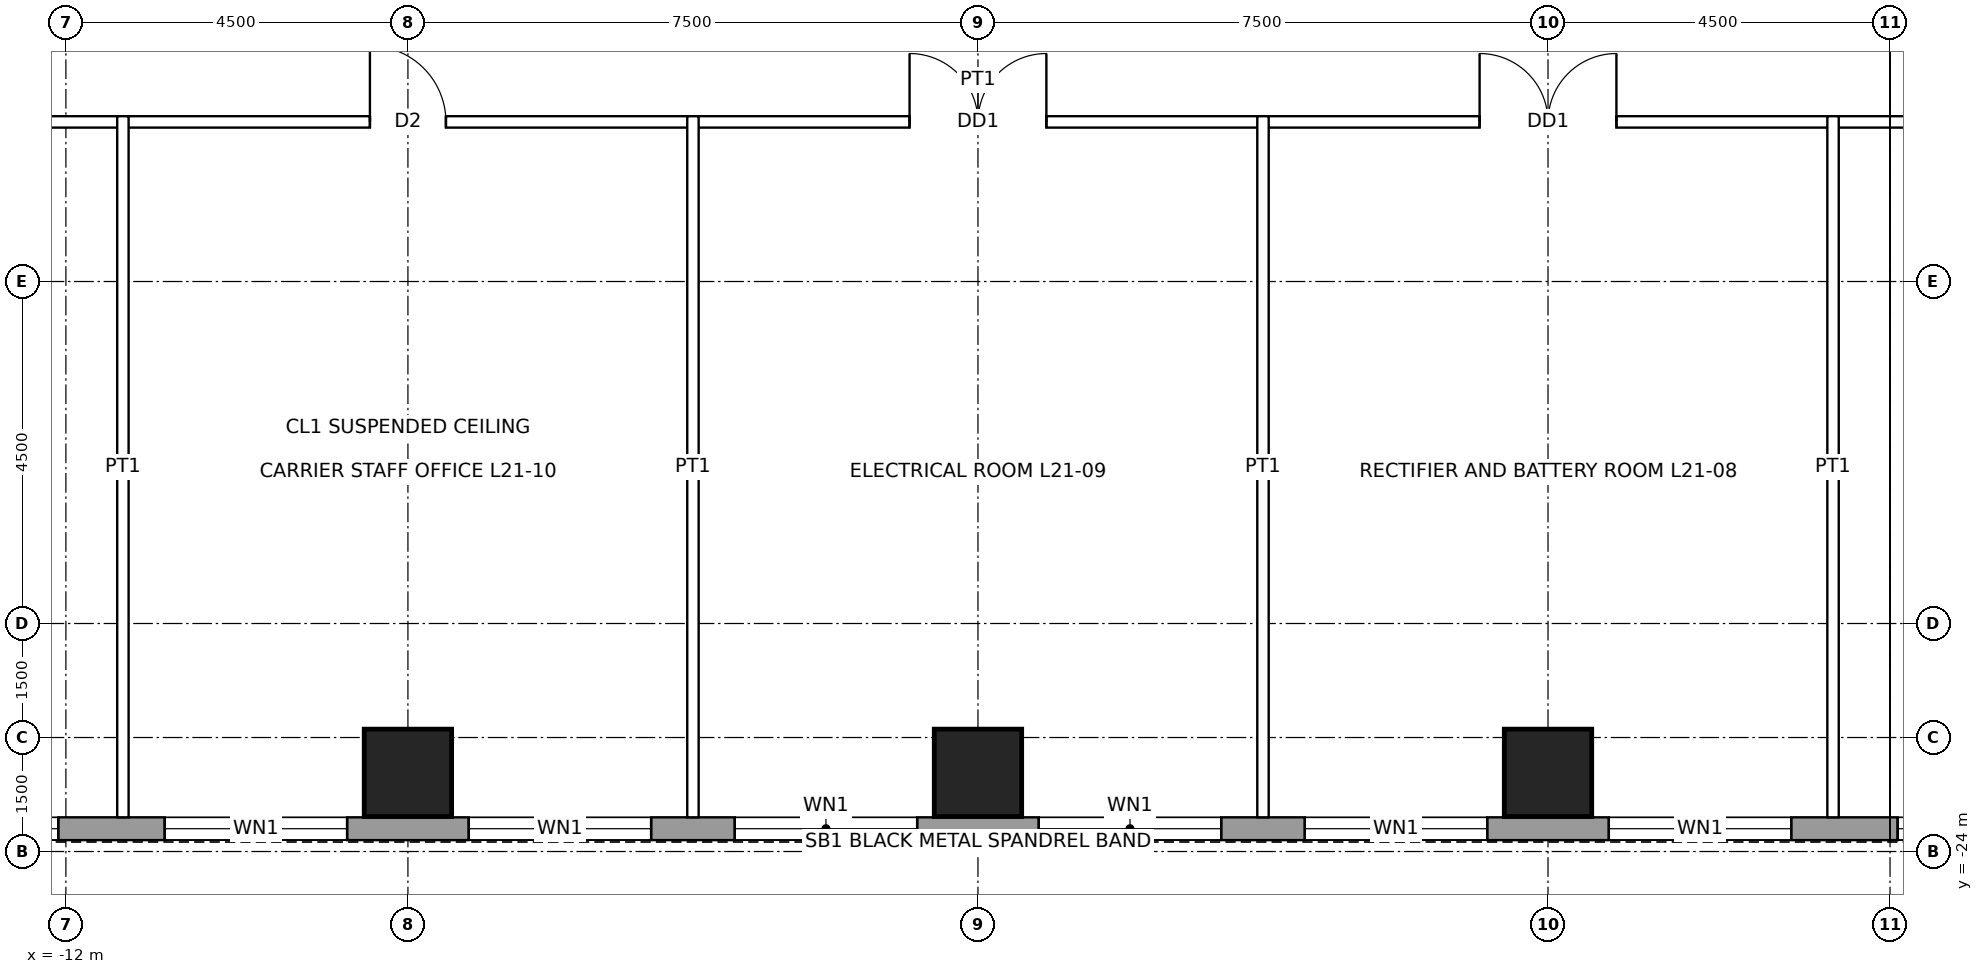
"""IFC4 building model, lengths in metres.
Left out: names, types, materials, properties, quantities, classifications, styles, units other than length and angle.
Written with IfcOpenShell. Run it as: python <this file> out.ifc"""

import sys

from ifc_helpers import new_model, si_unit, direction, frame, frame_2d, origin, origin_2d, place, context, subcontext, project, spatial, rectangle, hollow_rectangle, extrude, element, fill, save


model = new_model("IFC4")
c1 = context("Model", 3, precision=1e-05, world=origin(), true_north=direction((0.0, 1.0)))
c2 = subcontext(c1, "Body", "Model", "MODEL_VIEW")
j1 = project(units=[si_unit("LENGTHUNIT", "METRE"), si_unit("PLANEANGLEUNIT", "RADIAN")], contexts=[c1])
p1 = place(None, origin())
s1 = spatial("IfcSite", under=j1, at=p1, CompositionType="ELEMENT")
p2 = place(p1, origin())
s2 = spatial("IfcBuilding", under=s1, at=p2, CompositionType="ELEMENT")
p3 = place(p2, frame((0.0, 0.0, 108.9)))
s3 = spatial("IfcBuildingStorey", under=s2, at=p3, CompositionType="ELEMENT", Elevation=108.9)
for number, where, z_axis, x_axis in (
    (1, (7.5, -22.965, 0.0), (0.0, 0.0, 1.0), (1.0, 0.0, 0.0)),
    (2, (0.0, -22.965, 0.0), (0.0, 0.0, 1.0), (1.0, 0.0, 0.0)),
    (3, (-7.5, -22.965, 0.0), (0.0, 0.0, 1.0), (1.0, 0.0, 0.0)),
):
    element("IfcColumn", number, at=place(p3, frame(where, z_axis=z_axis, x_axis=x_axis)), inside=s3, PredefinedType="COLUMN", context=c2, shape_type="SweptSolid", body=[
        extrude(hollow_rectangle(XDim=1.15, YDim=1.15, WallThickness=0.075, at=origin_2d()), origin(), (0.0, 0.0, 1.0), 4.5),
    ])
p4 = place(p3, frame((16.2, -23.7, 0.0), z_axis=(0.0, 0.0, 1.0), x_axis=(-1.0, 0.0, 0.0)))
e4 = element("IfcWall", 4, at=p4, inside=s3, PredefinedType="SOLIDWALL", context=c2, shape_type="SweptSolid", body=[
    extrude(rectangle(XDim=32.4, YDim=0.3, at=frame_2d((16.2, 0.0))), origin(), (0.0, 0.0, 1.0), 4.3),
])
p5 = place(p4, frame((2.3, 0.0, 1.0)))
e5 = element("IfcOpeningElement", 5, at=p5, cuts=e4, PredefinedType="OPENING", context=c2, shape_type="SweptSolid", body=[
    extrude(rectangle(XDim=1.8, YDim=1.2, at=frame_2d((0.9, 0.6))), frame((0.0, 0.16, 0.0), z_axis=(0.0, -1.0, 0.0), x_axis=(1.0, 0.0, 0.0)), (0.0, 0.0, 1.0), 0.32),
])
p6 = place(p4, frame((5.5, 0.0, 1.0)))
e6 = element("IfcOpeningElement", 6, at=p6, cuts=e4, PredefinedType="OPENING", context=c2, shape_type="SweptSolid", body=[
    extrude(rectangle(XDim=2.4, YDim=1.2, at=frame_2d((1.2, 0.6))), frame((0.0, 0.16, 0.0), z_axis=(0.0, -1.0, 0.0), x_axis=(1.0, 0.0, 0.0)), (0.0, 0.0, 1.0), 0.32),
])
p7 = place(p4, frame((9.5, 0.0, 1.0)))
e7 = element("IfcOpeningElement", 7, at=p7, cuts=e4, PredefinedType="OPENING", context=c2, shape_type="SweptSolid", body=[
    extrude(rectangle(XDim=2.4, YDim=1.2, at=frame_2d((1.2, 0.6))), frame((0.0, 0.16, 0.0), z_axis=(0.0, -1.0, 0.0), x_axis=(1.0, 0.0, 0.0)), (0.0, 0.0, 1.0), 0.32),
])
p8 = place(p4, frame((13.0, 0.0, 1.0)))
e8 = element("IfcOpeningElement", 8, at=p8, cuts=e4, PredefinedType="OPENING", context=c2, shape_type="SweptSolid", body=[
    extrude(rectangle(XDim=2.4, YDim=1.2, at=frame_2d((1.2, 0.6))), frame((0.0, 0.16, 0.0), z_axis=(0.0, -1.0, 0.0), x_axis=(1.0, 0.0, 0.0)), (0.0, 0.0, 1.0), 0.32),
])
p9 = place(p4, frame((17.0, 0.0, 1.0)))
e9 = element("IfcOpeningElement", 9, at=p9, cuts=e4, PredefinedType="OPENING", context=c2, shape_type="SweptSolid", body=[
    extrude(rectangle(XDim=2.4, YDim=1.2, at=frame_2d((1.2, 0.6))), frame((0.0, 0.16, 0.0), z_axis=(0.0, -1.0, 0.0), x_axis=(1.0, 0.0, 0.0)), (0.0, 0.0, 1.0), 0.32),
])
p10 = place(p4, frame((20.5, 0.0, 1.0)))
e10 = element("IfcOpeningElement", 10, at=p10, cuts=e4, PredefinedType="OPENING", context=c2, shape_type="SweptSolid", body=[
    extrude(rectangle(XDim=2.4, YDim=1.2, at=frame_2d((1.2, 0.6))), frame((0.0, 0.16, 0.0), z_axis=(0.0, -1.0, 0.0), x_axis=(1.0, 0.0, 0.0)), (0.0, 0.0, 1.0), 0.32),
])
p11 = place(p4, frame((24.5, 0.0, 1.0)))
e11 = element("IfcOpeningElement", 11, at=p11, cuts=e4, PredefinedType="OPENING", context=c2, shape_type="SweptSolid", body=[
    extrude(rectangle(XDim=2.4, YDim=1.2, at=frame_2d((1.2, 0.6))), frame((0.0, 0.16, 0.0), z_axis=(0.0, -1.0, 0.0), x_axis=(1.0, 0.0, 0.0)), (0.0, 0.0, 1.0), 0.32),
])
p12 = place(p4, frame((28.3, 0.0, 1.0)))
e12 = element("IfcOpeningElement", 12, at=p12, cuts=e4, PredefinedType="OPENING", context=c2, shape_type="SweptSolid", body=[
    extrude(rectangle(XDim=1.8, YDim=1.2, at=frame_2d((0.9, 0.6))), frame((0.0, 0.16, 0.0), z_axis=(0.0, -1.0, 0.0), x_axis=(1.0, 0.0, 0.0)), (0.0, 0.0, 1.0), 0.32),
])
p13 = place(p3, frame((-14.475, -14.4, 0.0), z_axis=(0.0, 0.0, 1.0), x_axis=(1.0, 0.0, 0.0)))
e13 = element("IfcWall", 13, at=p13, inside=s3, PredefinedType="PARTITIONING", context=c2, shape_type="SweptSolid", body=[
    extrude(rectangle(XDim=28.95, YDim=0.15, at=frame_2d((14.475, 0.0))), origin(), (0.0, 0.0, 1.0), 4.3),
])
p14 = place(p13, frame((21.075, 0.0, 0.0)))
e14 = element("IfcOpeningElement", 14, at=p14, cuts=e13, PredefinedType="OPENING", context=c2, shape_type="SweptSolid", body=[
    extrude(rectangle(XDim=1.8, YDim=2.4, at=frame_2d((0.9, 1.2))), frame((0.0, 0.085, 0.0), z_axis=(0.0, -1.0, 0.0), x_axis=(1.0, 0.0, 0.0)), (0.0, 0.0, 1.0), 0.17),
])
p15 = place(p13, frame((13.575, 0.0, 0.0)))
e15 = element("IfcOpeningElement", 15, at=p15, cuts=e13, PredefinedType="OPENING", context=c2, shape_type="SweptSolid", body=[
    extrude(rectangle(XDim=1.8, YDim=2.4, at=frame_2d((0.9, 1.2))), frame((0.0, 0.085, 0.0), z_axis=(0.0, -1.0, 0.0), x_axis=(1.0, 0.0, 0.0)), (0.0, 0.0, 1.0), 0.17),
])
p16 = place(p13, frame((6.475, 0.0, 0.0)))
e16 = element("IfcOpeningElement", 16, at=p16, cuts=e13, PredefinedType="OPENING", context=c2, shape_type="SweptSolid", body=[
    extrude(rectangle(XDim=1.0, YDim=2.1, at=frame_2d((0.5, 1.05))), frame((0.0, 0.085, 0.0), z_axis=(0.0, -1.0, 0.0), x_axis=(1.0, 0.0, 0.0)), (0.0, 0.0, 1.0), 0.17),
])
p17 = place(p13, frame((26.8, 0.0, 0.0)))
e17 = element("IfcOpeningElement", 17, at=p17, cuts=e13, PredefinedType="OPENING", context=c2, shape_type="SweptSolid", body=[
    extrude(rectangle(XDim=1.0, YDim=2.1, at=frame_2d((0.5, 1.05))), frame((0.0, 0.085, 0.0), z_axis=(0.0, -1.0, 0.0), x_axis=(1.0, 0.0, 0.0)), (0.0, 0.0, 1.0), 0.17),
])
p18 = place(p13, frame((1.15, 0.0, 0.0)))
e18 = element("IfcOpeningElement", 18, at=p18, cuts=e13, PredefinedType="OPENING", context=c2, shape_type="SweptSolid", body=[
    extrude(rectangle(XDim=1.0, YDim=2.1, at=frame_2d((0.5, 1.05))), frame((0.0, 0.085, 0.0), z_axis=(0.0, -1.0, 0.0), x_axis=(1.0, 0.0, 0.0)), (0.0, 0.0, 1.0), 0.17),
])
for number, where, z_axis, x_axis in (
    (19, (-11.25, -23.55, 0.0), (0.0, 0.0, 1.0), (0.0, 1.0, 0.0)),
    (20, (-3.75, -23.55, 0.0), (0.0, 0.0, 1.0), (0.0, 1.0, 0.0)),
    (21, (3.75, -23.55, 0.0), (0.0, 0.0, 1.0), (0.0, 1.0, 0.0)),
    (22, (11.25, -23.55, 0.0), (0.0, 0.0, 1.0), (0.0, 1.0, 0.0)),
):
    element("IfcWall", number, at=place(p3, frame(where, z_axis=z_axis, x_axis=x_axis)), inside=s3, PredefinedType="PARTITIONING", context=c2, shape_type="SweptSolid", body=[
        extrude(rectangle(XDim=9.225, YDim=0.15, at=frame_2d((4.613, 0.0))), origin(), (0.0, 0.0, 1.0), 3.431),
    ])
p19 = place(p5, origin())
e23 = element("IfcWindow", 23, at=p19, inside=s3, PartitioningType="SINGLE_PANEL", PredefinedType="WINDOW", context=c2, shape_type="SweptSolid", body=[
    extrude(rectangle(XDim=1.8, YDim=1.2, at=frame_2d((0.9, 0.6))), frame((0.0, 0.03, 0.0), z_axis=(0.0, -1.0, 0.0), x_axis=(1.0, 0.0, 0.0)), (0.0, 0.0, 1.0), 0.06),
])
fill(e5, e23)
p20 = place(p6, origin())
e24 = element("IfcWindow", 24, at=p20, inside=s3, PartitioningType="SINGLE_PANEL", PredefinedType="WINDOW", context=c2, shape_type="SweptSolid", body=[
    extrude(rectangle(XDim=2.4, YDim=1.2, at=frame_2d((1.2, 0.6))), frame((0.0, 0.03, 0.0), z_axis=(0.0, -1.0, 0.0), x_axis=(1.0, 0.0, 0.0)), (0.0, 0.0, 1.0), 0.06),
])
fill(e6, e24)
p21 = place(p7, origin())
e25 = element("IfcWindow", 25, at=p21, inside=s3, PartitioningType="SINGLE_PANEL", PredefinedType="WINDOW", context=c2, shape_type="SweptSolid", body=[
    extrude(rectangle(XDim=2.4, YDim=1.2, at=frame_2d((1.2, 0.6))), frame((0.0, 0.03, 0.0), z_axis=(0.0, -1.0, 0.0), x_axis=(1.0, 0.0, 0.0)), (0.0, 0.0, 1.0), 0.06),
])
fill(e7, e25)
p22 = place(p8, origin())
e26 = element("IfcWindow", 26, at=p22, inside=s3, PartitioningType="SINGLE_PANEL", PredefinedType="WINDOW", context=c2, shape_type="SweptSolid", body=[
    extrude(rectangle(XDim=2.4, YDim=1.2, at=frame_2d((1.2, 0.6))), frame((0.0, 0.03, 0.0), z_axis=(0.0, -1.0, 0.0), x_axis=(1.0, 0.0, 0.0)), (0.0, 0.0, 1.0), 0.06),
])
fill(e8, e26)
p23 = place(p9, origin())
e27 = element("IfcWindow", 27, at=p23, inside=s3, PartitioningType="SINGLE_PANEL", PredefinedType="WINDOW", context=c2, shape_type="SweptSolid", body=[
    extrude(rectangle(XDim=2.4, YDim=1.2, at=frame_2d((1.2, 0.6))), frame((0.0, 0.03, 0.0), z_axis=(0.0, -1.0, 0.0), x_axis=(1.0, 0.0, 0.0)), (0.0, 0.0, 1.0), 0.06),
])
fill(e9, e27)
p24 = place(p10, origin())
e28 = element("IfcWindow", 28, at=p24, inside=s3, PartitioningType="SINGLE_PANEL", PredefinedType="WINDOW", context=c2, shape_type="SweptSolid", body=[
    extrude(rectangle(XDim=2.4, YDim=1.2, at=frame_2d((1.2, 0.6))), frame((0.0, 0.03, 0.0), z_axis=(0.0, -1.0, 0.0), x_axis=(1.0, 0.0, 0.0)), (0.0, 0.0, 1.0), 0.06),
])
fill(e10, e28)
p25 = place(p11, origin())
e29 = element("IfcWindow", 29, at=p25, inside=s3, PartitioningType="SINGLE_PANEL", PredefinedType="WINDOW", context=c2, shape_type="SweptSolid", body=[
    extrude(rectangle(XDim=2.4, YDim=1.2, at=frame_2d((1.2, 0.6))), frame((0.0, 0.03, 0.0), z_axis=(0.0, -1.0, 0.0), x_axis=(1.0, 0.0, 0.0)), (0.0, 0.0, 1.0), 0.06),
])
fill(e11, e29)
p26 = place(p12, origin())
e30 = element("IfcWindow", 30, at=p26, inside=s3, PartitioningType="SINGLE_PANEL", PredefinedType="WINDOW", context=c2, shape_type="SweptSolid", body=[
    extrude(rectangle(XDim=1.8, YDim=1.2, at=frame_2d((0.9, 0.6))), frame((0.0, 0.03, 0.0), z_axis=(0.0, -1.0, 0.0), x_axis=(1.0, 0.0, 0.0)), (0.0, 0.0, 1.0), 0.06),
])
fill(e12, e30)
p27 = place(p14, origin())
e31 = element("IfcDoor", 31, at=p27, inside=s3, OperationType="DOUBLE_DOOR_SINGLE_SWING", PredefinedType="DOOR", context=c2, shape_type="SweptSolid", body=[
    extrude(rectangle(XDim=1.8, YDim=2.4, at=frame_2d((0.9, 1.2))), frame((0.0, 0.025, 0.0), z_axis=(0.0, -1.0, 0.0), x_axis=(1.0, 0.0, 0.0)), (0.0, 0.0, 1.0), 0.05),
])
fill(e14, e31)
p28 = place(p15, origin())
e32 = element("IfcDoor", 32, at=p28, inside=s3, OperationType="DOUBLE_DOOR_SINGLE_SWING", PredefinedType="DOOR", context=c2, shape_type="SweptSolid", body=[
    extrude(rectangle(XDim=1.8, YDim=2.4, at=frame_2d((0.9, 1.2))), frame((0.0, 0.025, 0.0), z_axis=(0.0, -1.0, 0.0), x_axis=(1.0, 0.0, 0.0)), (0.0, 0.0, 1.0), 0.05),
])
fill(e15, e32)
p29 = place(p16, origin())
e33 = element("IfcDoor", 33, at=p29, inside=s3, OperationType="SINGLE_SWING_LEFT", PredefinedType="DOOR", context=c2, shape_type="SweptSolid", body=[
    extrude(rectangle(XDim=1.0, YDim=2.1, at=frame_2d((0.5, 1.05))), frame((0.0, 0.025, 0.0), z_axis=(0.0, -1.0, 0.0), x_axis=(1.0, 0.0, 0.0)), (0.0, 0.0, 1.0), 0.05),
])
fill(e16, e33)
save(model, sys.argv[1])
